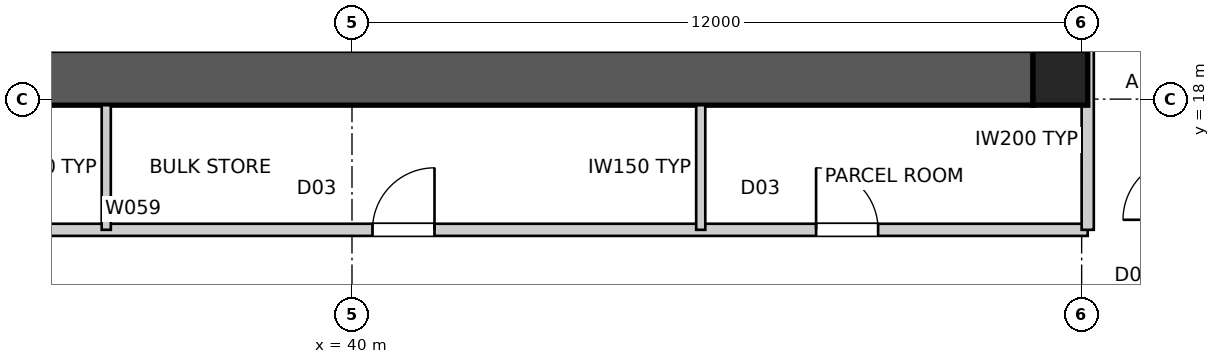
"""IFC4 building model, lengths in metres.
Left out: names, types, materials, properties, quantities, classifications, styles, units other than length and angle.
Written with IfcOpenShell. Run it as: python <this file> out.ifc"""

import sys

from ifc_helpers import new_model, si_unit, direction, frame, frame_2d, origin, origin_2d, place, context, subcontext, project, spatial, polyline, rectangle, outline, extrude, element, fill, save


model = new_model("IFC4")
c1 = context("Model", 3, precision=1e-05, world=origin(), true_north=direction((0.0, 1.0)))
c2 = subcontext(c1, "Body", "Model", "MODEL_VIEW")
j1 = project(units=[si_unit("LENGTHUNIT", "METRE"), si_unit("PLANEANGLEUNIT", "RADIAN")], contexts=[c1])
p1 = place(None, origin())
s1 = spatial("IfcSite", under=j1, at=p1, CompositionType="ELEMENT")
p2 = place(p1, origin())
s2 = spatial("IfcBuilding", under=s1, at=p2, CompositionType="ELEMENT")
p3 = place(p2, frame((0.0, 0.0, 32.0)))
s3 = spatial("IfcBuildingStorey", under=s2, at=p3, CompositionType="ELEMENT", Elevation=32.0)
p4 = place(p3, frame((51.2, 18.35, 0.0), z_axis=(0.0, 0.0, 1.0), x_axis=(-1.0, 0.0, 0.0)))
e1 = element("IfcWall", 1, at=p4, inside=s3, PredefinedType="SHEAR", context=c2, shape_type="SweptSolid", body=[
    extrude(outline(polyline([(0.0, -0.45), (22.4, -0.45), (22.4, -0.025), (22.85, -0.025), (22.85, 0.025), (22.4, 0.025), (22.4, 0.45), (0.0, 0.45), (0.0, 0.025), (-0.45, 0.025), (-0.45, -0.025), (0.0, -0.025), (0.0, -0.45)])), origin(), (0.0, 0.0, 1.0), 3.4),
])
p5 = place(p3, frame((51.65, 18.8, 0.0), z_axis=(0.0, 0.0, 1.0), x_axis=(0.0, 1.0, 0.0)))
e2 = element("IfcWall", 2, at=p5, inside=s3, PredefinedType="SHEAR", context=c2, shape_type="SweptSolid", body=[
    extrude(outline(polyline([(0.0, -0.45), (22.4, -0.45), (22.4, -0.025), (22.85, -0.025), (22.85, 0.025), (22.4, 0.025), (22.4, 0.45), (0.0, 0.45), (0.0, 0.025), (-0.45, 0.025), (-0.45, -0.025), (0.0, -0.025), (0.0, -0.45)])), origin(), (0.0, 0.0, 1.0), 3.4),
])
p6 = place(p5, frame((11.14, 0.0, 0.0)))
e3 = element("IfcOpeningElement", 3, at=p6, cuts=e2, PredefinedType="OPENING", context=c2, shape_type="SweptSolid", body=[
    extrude(rectangle(XDim=1.02, YDim=2.4, at=frame_2d((0.51, 1.2))), frame((0.0, 0.46, 0.0), z_axis=(0.0, -1.0, 0.0), x_axis=(1.0, 0.0, 0.0)), (0.0, 0.0, 1.0), 0.92),
])
p7 = place(p3, frame((51.65, 18.35, 0.0), z_axis=(0.0, 0.0, 1.0), x_axis=(1.0, 0.0, 0.0)))
e4 = element("IfcColumn", 4, at=p7, inside=s3, PredefinedType="COLUMN", context=c2, shape_type="SweptSolid", body=[
    extrude(rectangle(XDim=0.9, YDim=0.9, at=origin_2d()), origin(), (0.0, 0.0, 1.0), 3.4),
])
p8 = place(p3, frame((27.9, 15.85, 0.0), z_axis=(0.0, 0.0, 1.0), x_axis=(1.0, 0.0, 0.0)))
e5 = element("IfcWall", 5, at=p8, inside=s3, PredefinedType="PARTITIONING", context=c2, shape_type="SweptSolid", body=[
    extrude(rectangle(XDim=24.2, YDim=0.2, at=frame_2d((12.1, 0.0))), origin(), (0.0, 0.0, 1.0), 3.25),
])
p9 = place(p8, frame((12.437, 0.0, 0.0)))
e6 = element("IfcOpeningElement", 6, at=p9, cuts=e5, PredefinedType="OPENING", context=c2, shape_type="SweptSolid", body=[
    extrude(rectangle(XDim=1.02, YDim=2.1, at=frame_2d((0.51, 1.05))), frame((0.0, 0.11, 0.0), z_axis=(0.0, -1.0, 0.0), x_axis=(1.0, 0.0, 0.0)), (0.0, 0.0, 1.0), 0.22),
])
p10 = place(p8, frame((3.544, 0.0, 0.0)))
e7 = element("IfcOpeningElement", 7, at=p10, cuts=e5, PredefinedType="OPENING", context=c2, shape_type="SweptSolid", body=[
    extrude(rectangle(XDim=1.02, YDim=2.1, at=frame_2d((0.51, 1.05))), frame((0.0, 0.11, 0.0), z_axis=(0.0, -1.0, 0.0), x_axis=(1.0, 0.0, 0.0)), (0.0, 0.0, 1.0), 0.22),
])
p11 = place(p8, frame((19.733, 0.0, 0.0)))
e8 = element("IfcOpeningElement", 8, at=p11, cuts=e5, PredefinedType="OPENING", context=c2, shape_type="SweptSolid", body=[
    extrude(rectangle(XDim=1.02, YDim=2.1, at=frame_2d((0.51, 1.05))), frame((0.0, 0.11, 0.0), z_axis=(0.0, -1.0, 0.0), x_axis=(1.0, 0.0, 0.0)), (0.0, 0.0, 1.0), 0.22),
])
p12 = place(p3, frame((52.1, 15.85, 0.0), z_axis=(0.0, 0.0, 1.0), x_axis=(0.0, 1.0, 0.0)))
e9 = element("IfcWall", 9, at=p12, inside=s3, PredefinedType="PARTITIONING", context=c2, shape_type="SweptSolid", body=[
    extrude(rectangle(XDim=2.97, YDim=0.2, at=frame_2d((1.485, 0.0))), origin(), (0.0, 0.0, 1.0), 3.25),
])
p13 = place(p3, frame((35.958, 15.85, 0.0), z_axis=(0.0, 0.0, 1.0), x_axis=(0.0, 1.0, 0.0)))
e10 = element("IfcWall", 10, at=p13, inside=s3, PredefinedType="SOLIDWALL", context=c2, shape_type="SweptSolid", body=[
    extrude(rectangle(XDim=2.05, YDim=0.15, at=frame_2d((1.025, 0.0))), origin(), (0.0, 0.0, 1.0), 3.25),
])
p14 = place(p3, frame((45.735, 15.85, 0.0), z_axis=(0.0, 0.0, 1.0), x_axis=(0.0, 1.0, 0.0)))
e11 = element("IfcWall", 11, at=p14, inside=s3, PredefinedType="SOLIDWALL", context=c2, shape_type="SweptSolid", body=[
    extrude(rectangle(XDim=2.05, YDim=0.15, at=frame_2d((1.025, 0.0))), origin(), (0.0, 0.0, 1.0), 2.796),
])
p15 = place(p9, origin())
e12 = element("IfcDoor", 12, at=p15, inside=s3, OperationType="SINGLE_SWING_RIGHT", PredefinedType="DOOR", context=c2, shape_type="SweptSolid", body=[
    extrude(rectangle(XDim=1.02, YDim=2.1, at=frame_2d((0.51, 1.05))), frame((0.0, 0.025, 0.0), z_axis=(0.0, -1.0, 0.0), x_axis=(1.0, 0.0, 0.0)), (0.0, 0.0, 1.0), 0.05),
])
fill(e6, e12)
p16 = place(p11, origin())
e13 = element("IfcDoor", 13, at=p16, inside=s3, OperationType="SINGLE_SWING_LEFT", PredefinedType="DOOR", context=c2, shape_type="SweptSolid", body=[
    extrude(rectangle(XDim=1.02, YDim=2.1, at=frame_2d((0.51, 1.05))), frame((0.0, 0.025, 0.0), z_axis=(0.0, -1.0, 0.0), x_axis=(1.0, 0.0, 0.0)), (0.0, 0.0, 1.0), 0.05),
])
fill(e8, e13)
save(model, sys.argv[1])
